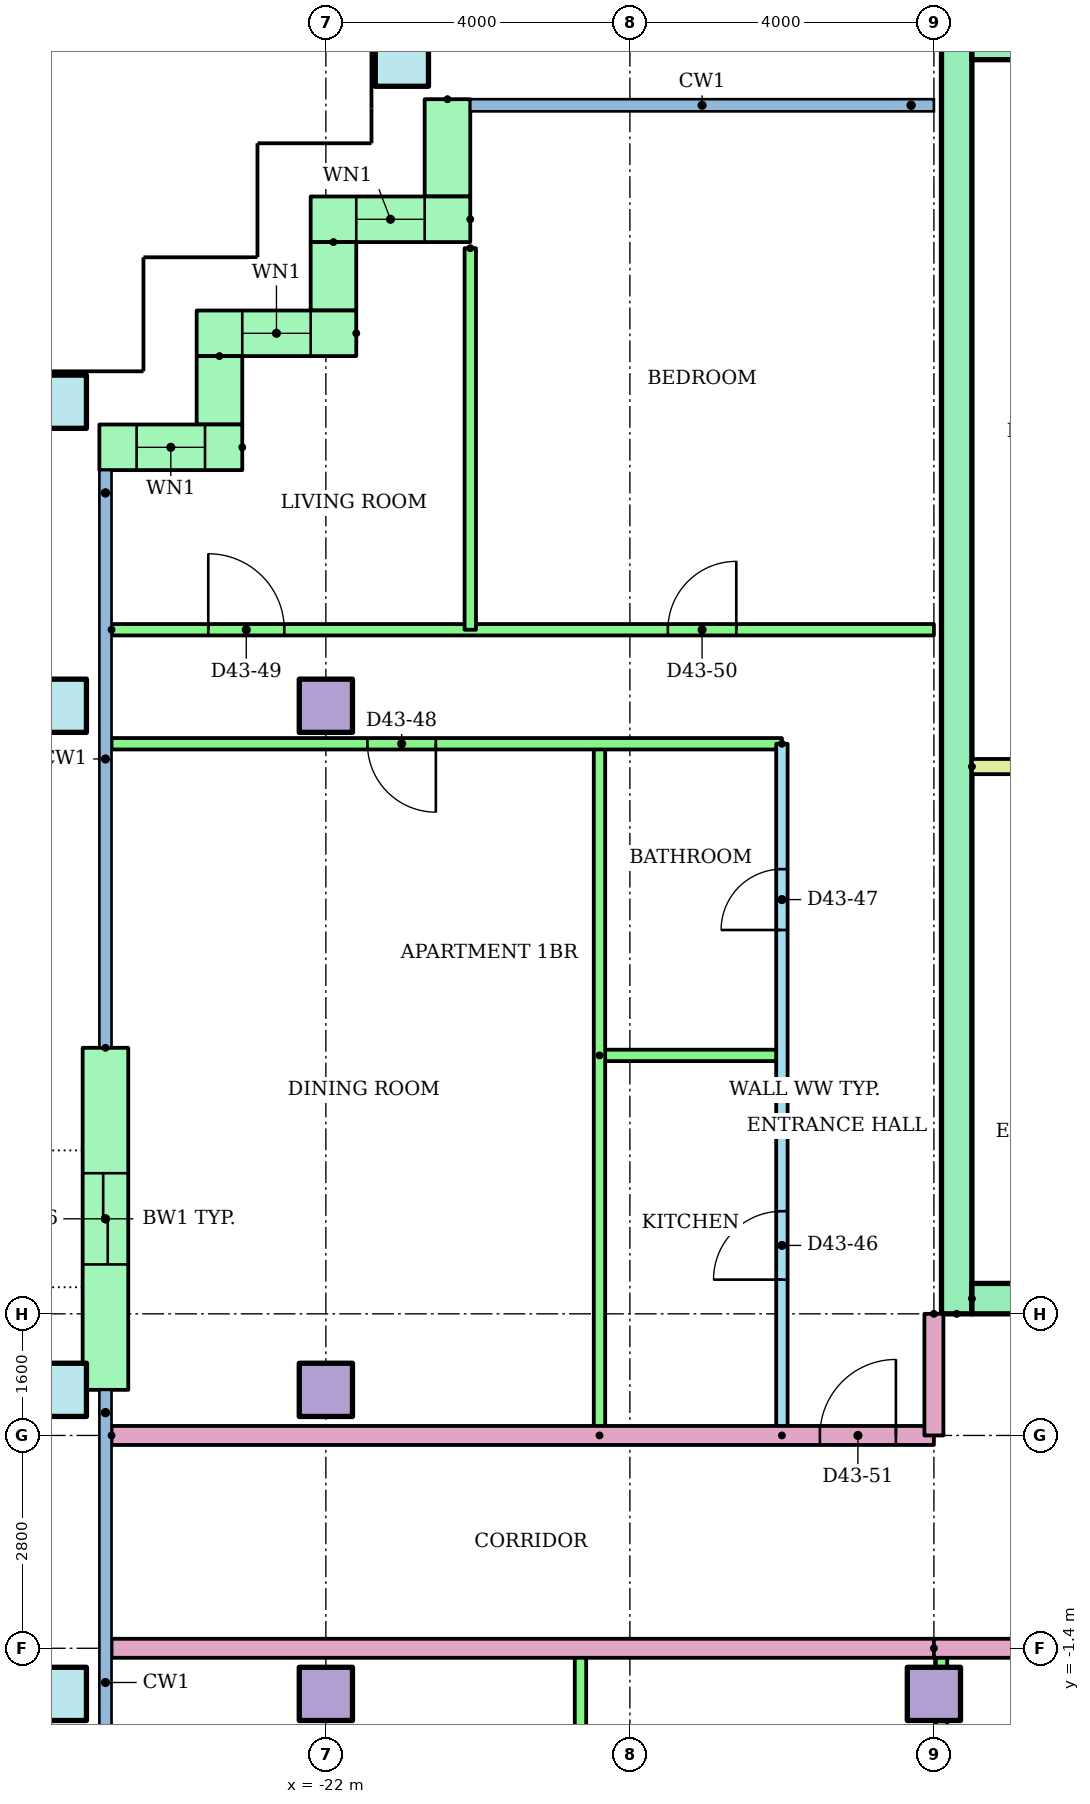
"""IFC4 building model, lengths in metres.
Left out: names, types, materials, properties, quantities, classifications, styles, units other than length and angle.
Written with IfcOpenShell. Run it as: python <this file> out.ifc"""

import sys

from ifc_helpers import new_model, si_unit, direction, frame, frame_2d, origin, origin_2d, place, context, subcontext, project, spatial, rectangle, hollow_rectangle, extrude, element, fill, save


model = new_model("IFC4")
c1 = context("Model", 3, precision=1e-05, world=origin(), true_north=direction((0.0, 1.0)))
c2 = subcontext(c1, "Body", "Model", "MODEL_VIEW")
j1 = project(units=[si_unit("LENGTHUNIT", "METRE"), si_unit("PLANEANGLEUNIT", "RADIAN")], contexts=[c1])
p1 = place(None, origin())
s1 = spatial("IfcSite", under=j1, at=p1, CompositionType="ELEMENT")
p2 = place(p1, origin())
s2 = spatial("IfcBuilding", under=s1, at=p2, CompositionType="ELEMENT")
p3 = place(p2, frame((0.0, 0.0, 168.5)))
s3 = spatial("IfcBuildingStorey", under=s2, at=p3, CompositionType="ELEMENT", Elevation=168.5)
p4 = place(p3, frame((-25.5, -2.0, 0.0)))
e1 = element("IfcColumn", 1, at=p4, inside=s3, PredefinedType="COLUMN", context=c2, shape_type="SweptSolid", body=[
    extrude(hollow_rectangle(XDim=0.7, YDim=0.7, WallThickness=0.036, at=origin_2d()), origin(), (0.0, 0.0, 1.0), 3.2),
])
for number, where in (
    (2, (-22.0, -2.0, 0.0)),
    (3, (-14.0, -2.0, 0.0)),
):
    element("IfcColumn", number, at=place(p3, frame(where)), inside=s3, PredefinedType="COLUMN", context=c2, shape_type="SweptSolid", body=[
        extrude(rectangle(XDim=0.7, YDim=0.7, at=origin_2d()), origin(), (0.0, 0.0, 1.0), 3.2),
    ])
p5 = place(p3, frame((-25.5, 2.0, 0.0)))
e4 = element("IfcColumn", 4, at=p5, inside=s3, PredefinedType="COLUMN", context=c2, shape_type="SweptSolid", body=[
    extrude(hollow_rectangle(XDim=0.7, YDim=0.7, WallThickness=0.036, at=origin_2d()), origin(), (0.0, 0.0, 1.0), 3.2),
])
p6 = place(p3, frame((-22.0, 2.0, 0.0)))
e5 = element("IfcColumn", 5, at=p6, inside=s3, PredefinedType="COLUMN", context=c2, shape_type="SweptSolid", body=[
    extrude(rectangle(XDim=0.7, YDim=0.7, at=origin_2d()), origin(), (0.0, 0.0, 1.0), 3.2),
])
p7 = place(p3, frame((-25.5, 11.0, 0.0)))
e6 = element("IfcColumn", 6, at=p7, inside=s3, PredefinedType="COLUMN", context=c2, shape_type="SweptSolid", body=[
    extrude(hollow_rectangle(XDim=0.7, YDim=0.7, WallThickness=0.036, at=origin_2d()), origin(), (0.0, 0.0, 1.0), 3.2),
])
p8 = place(p3, frame((-22.0, 11.0, 0.0)))
e7 = element("IfcColumn", 7, at=p8, inside=s3, PredefinedType="COLUMN", context=c2, shape_type="SweptSolid", body=[
    extrude(rectangle(XDim=0.7, YDim=0.7, at=origin_2d()), origin(), (0.0, 0.0, 1.0), 3.2),
])
for number, where in (
    (8, (-25.5, 15.0, 0.0)),
    (9, (-21.0, 19.5, 0.0)),
):
    element("IfcColumn", number, at=place(p3, frame(where)), inside=s3, PredefinedType="COLUMN", context=c2, shape_type="SweptSolid", body=[
        extrude(hollow_rectangle(XDim=0.7, YDim=0.7, WallThickness=0.036, at=origin_2d()), origin(), (0.0, 0.0, 1.0), 3.2),
    ])
p9 = place(p3, frame((-20.4, 18.98, 0.0), z_axis=(0.0, 0.0, 1.0), x_axis=(0.0, -1.0, 0.0)))
e10 = element("IfcWall", 10, at=p9, inside=s3, PredefinedType="STANDARD", context=c2, shape_type="SweptSolid", body=[
    extrude(rectangle(XDim=1.28, YDim=0.6, at=frame_2d((0.64, 0.0))), origin(), (0.0, 0.0, 1.0), 2.92),
])
p10 = place(p3, frame((-20.1, 17.4, 0.0), z_axis=(0.0, 0.0, 1.0), x_axis=(-1.0, 0.0, 0.0)))
e11 = element("IfcWall", 11, at=p10, inside=s3, PredefinedType="STANDARD", context=c2, shape_type="SweptSolid", body=[
    extrude(rectangle(XDim=2.1, YDim=0.6, at=frame_2d((1.05, 0.0))), origin(), (0.0, 0.0, 1.0), 2.92),
])
p11 = place(p10, frame((0.6, 0.0, 0.9)))
e12 = element("IfcOpeningElement", 12, at=p11, cuts=e11, PredefinedType="OPENING", context=c2, shape_type="SweptSolid", body=[
    extrude(rectangle(XDim=0.9, YDim=1.5, at=frame_2d((0.45, 0.75))), frame((0.0, 0.31, 0.0), z_axis=(0.0, -1.0, 0.0), x_axis=(1.0, 0.0, 0.0)), (0.0, 0.0, 1.0), 0.62),
])
p12 = place(p3, frame((-21.9, 17.1, 0.0), z_axis=(0.0, 0.0, 1.0), x_axis=(0.0, -1.0, 0.0)))
e13 = element("IfcWall", 13, at=p12, inside=s3, PredefinedType="STANDARD", context=c2, shape_type="SweptSolid", body=[
    extrude(rectangle(XDim=0.9, YDim=0.6, at=frame_2d((0.45, 0.0))), origin(), (0.0, 0.0, 1.0), 2.92),
])
p13 = place(p3, frame((-21.6, 15.9, 0.0), z_axis=(0.0, 0.0, 1.0), x_axis=(-1.0, 0.0, 0.0)))
e14 = element("IfcWall", 14, at=p13, inside=s3, PredefinedType="STANDARD", context=c2, shape_type="SweptSolid", body=[
    extrude(rectangle(XDim=2.1, YDim=0.6, at=frame_2d((1.05, 0.0))), origin(), (0.0, 0.0, 1.0), 2.92),
])
p14 = place(p13, frame((0.6, 0.0, 0.9)))
e15 = element("IfcOpeningElement", 15, at=p14, cuts=e14, PredefinedType="OPENING", context=c2, shape_type="SweptSolid", body=[
    extrude(rectangle(XDim=0.9, YDim=1.5, at=frame_2d((0.45, 0.75))), frame((0.0, 0.31, 0.0), z_axis=(0.0, -1.0, 0.0), x_axis=(1.0, 0.0, 0.0)), (0.0, 0.0, 1.0), 0.62),
])
p15 = place(p3, frame((-23.4, 15.6, 0.0), z_axis=(0.0, 0.0, 1.0), x_axis=(0.0, -1.0, 0.0)))
e16 = element("IfcWall", 16, at=p15, inside=s3, PredefinedType="STANDARD", context=c2, shape_type="SweptSolid", body=[
    extrude(rectangle(XDim=0.9, YDim=0.6, at=frame_2d((0.45, 0.0))), origin(), (0.0, 0.0, 1.0), 2.92),
])
p16 = place(p3, frame((-23.1, 14.4, 0.0), z_axis=(0.0, 0.0, 1.0), x_axis=(-1.0, 0.0, 0.0)))
e17 = element("IfcWall", 17, at=p16, inside=s3, PredefinedType="STANDARD", context=c2, shape_type="SweptSolid", body=[
    extrude(rectangle(XDim=1.88, YDim=0.6, at=frame_2d((0.94, 0.0))), origin(), (0.0, 0.0, 1.0), 2.92),
])
p17 = place(p16, frame((0.49, 0.0, 0.9)))
e18 = element("IfcOpeningElement", 18, at=p17, cuts=e17, PredefinedType="OPENING", context=c2, shape_type="SweptSolid", body=[
    extrude(rectangle(XDim=0.9, YDim=1.5, at=frame_2d((0.45, 0.75))), frame((0.0, 0.31, 0.0), z_axis=(0.0, -1.0, 0.0), x_axis=(1.0, 0.0, 0.0)), (0.0, 0.0, 1.0), 0.62),
])
p18 = place(p3, frame((-24.9, 6.5, 0.0), z_axis=(0.0, 0.0, 1.0), x_axis=(0.0, -1.0, 0.0)))
e19 = element("IfcWall", 19, at=p18, inside=s3, PredefinedType="STANDARD", context=c2, shape_type="SweptSolid", body=[
    extrude(rectangle(XDim=4.5, YDim=0.6, at=frame_2d((2.25, 0.0))), origin(), (0.0, 0.0, 1.0), 2.92),
])
p19 = place(p18, frame((1.65, 0.0, 0.0)))
e20 = element("IfcOpeningElement", 20, at=p19, cuts=e19, PredefinedType="OPENING", context=c2, shape_type="SweptSolid", body=[
    extrude(rectangle(XDim=1.2, YDim=2.1, at=frame_2d((0.6, 1.05))), frame((0.0, 0.31, 0.0), z_axis=(0.0, -1.0, 0.0), x_axis=(1.0, 0.0, 0.0)), (0.0, 0.0, 1.0), 0.62),
])
p20 = place(p3, frame((-13.7, 3.0, 0.0), z_axis=(0.0, 0.0, 1.0), x_axis=(0.0, 1.0, 0.0)))
e21 = element("IfcWall", 21, at=p20, inside=s3, PredefinedType="SHEAR", context=c2, shape_type="SweptSolid", body=[
    extrude(rectangle(XDim=17.0, YDim=0.4, at=frame_2d((8.5, 0.0))), origin(), (0.0, 0.0, 1.0), 2.92),
])
p21 = place(p3, frame((-13.5, 19.7, 0.0)))
e22 = element("IfcWall", 22, at=p21, inside=s3, PredefinedType="SHEAR", context=c2, shape_type="SweptSolid", body=[
    extrude(rectangle(XDim=27.0, YDim=0.4, at=frame_2d((13.5, 0.0))), origin(), (0.0, 0.0, 1.0), 2.92),
])
p22 = place(p3, frame((-13.5, 3.2, 0.0)))
e23 = element("IfcWall", 23, at=p22, inside=s3, PredefinedType="SHEAR", context=c2, shape_type="SweptSolid", body=[
    extrude(rectangle(XDim=27.0, YDim=0.4, at=frame_2d((13.5, 0.0))), origin(), (0.0, 0.0, 1.0), 2.92),
])
p23 = place(p22, frame((22.083, 0.0, 0.0)))
e24 = element("IfcOpeningElement", 24, at=p23, cuts=e23, PredefinedType="OPENING", context=c2, shape_type="SweptSolid", body=[
    extrude(rectangle(XDim=1.1, YDim=2.1, at=frame_2d((0.55, 1.05))), frame((0.0, 0.21, 0.0), z_axis=(0.0, -1.0, 0.0), x_axis=(1.0, 0.0, 0.0)), (0.0, 0.0, 1.0), 0.42),
])
p24 = place(p22, frame((25.128, 0.0, 0.0)))
e25 = element("IfcOpeningElement", 25, at=p24, cuts=e23, PredefinedType="OPENING", context=c2, shape_type="SweptSolid", body=[
    extrude(rectangle(XDim=1.1, YDim=2.1, at=frame_2d((0.55, 1.05))), frame((0.0, 0.21, 0.0), z_axis=(0.0, -1.0, 0.0), x_axis=(1.0, 0.0, 0.0)), (0.0, 0.0, 1.0), 0.42),
])
p25 = place(p22, frame((12.6, 0.0, 0.0)))
e26 = element("IfcOpeningElement", 26, at=p25, cuts=e23, PredefinedType="OPENING", context=c2, shape_type="SweptSolid", body=[
    extrude(rectangle(XDim=1.8, YDim=2.1, at=frame_2d((0.9, 1.05))), frame((0.0, 0.21, 0.0), z_axis=(0.0, -1.0, 0.0), x_axis=(1.0, 0.0, 0.0)), (0.0, 0.0, 1.0), 0.42),
])
p26 = place(p3, frame((-13.5, 10.2, 0.0)))
e27 = element("IfcWall", 27, at=p26, inside=s3, PredefinedType="PARTITIONING", context=c2, shape_type="SweptSolid", body=[
    extrude(rectangle(XDim=3.9, YDim=0.2, at=frame_2d((1.95, 0.0))), origin(), (0.0, 0.0, 1.0), 2.92),
])
for number, where, z_axis, x_axis in (
    (28, (-13.9, -8.1, 0.0), (0.0, 0.0, 1.0), (0.0, 1.0, 0.0)),
    (29, (-18.65, -8.1, 0.0), (0.0, 0.0, 1.0), (0.0, 1.0, 0.0)),
):
    element("IfcWall", number, at=place(p3, frame(where, z_axis=z_axis, x_axis=x_axis)), inside=s3, PredefinedType="PARTITIONING", context=c2, shape_type="SweptSolid", body=[
        extrude(rectangle(XDim=6.7, YDim=0.15, at=frame_2d((3.35, 0.0))), origin(), (0.0, 0.0, 1.0), 2.4),
    ])
p27 = place(p3, frame((-14.0, -1.4, 0.0), z_axis=(0.0, 0.0, 1.0), x_axis=(-1.0, 0.0, 0.0)))
e30 = element("IfcWall", 30, at=p27, inside=s3, PredefinedType="PARTITIONING", context=c2, shape_type="SweptSolid", body=[
    extrude(rectangle(XDim=10.82, YDim=0.25, at=frame_2d((5.41, 0.0))), origin(), (0.0, 0.0, 1.0), 2.4),
])
p28 = place(p3, frame((-16.0, 1.4, 0.0), z_axis=(0.0, 0.0, 1.0), x_axis=(0.0, 1.0, 0.0)))
e31 = element("IfcWall", 31, at=p28, inside=s3, PredefinedType="PARTITIONING", context=c2, shape_type="SweptSolid", body=[
    extrude(rectangle(XDim=9.1, YDim=0.15, at=frame_2d((4.55, 0.0))), origin(), (0.0, 0.0, 1.0), 2.4),
])
p29 = place(p28, frame((2.05, 0.0, 0.0)))
e32 = element("IfcOpeningElement", 32, at=p29, cuts=e31, PredefinedType="OPENING", context=c2, shape_type="SweptSolid", body=[
    extrude(rectangle(XDim=0.9, YDim=2.1, at=frame_2d((0.45, 1.05))), frame((0.0, 0.085, 0.0), z_axis=(0.0, -1.0, 0.0), x_axis=(1.0, 0.0, 0.0)), (0.0, 0.0, 1.0), 0.17),
])
p30 = place(p28, frame((6.65, 0.0, 0.0)))
e33 = element("IfcOpeningElement", 33, at=p30, cuts=e31, PredefinedType="OPENING", context=c2, shape_type="SweptSolid", body=[
    extrude(rectangle(XDim=0.8, YDim=2.1, at=frame_2d((0.4, 1.05))), frame((0.0, 0.085, 0.0), z_axis=(0.0, -1.0, 0.0), x_axis=(1.0, 0.0, 0.0)), (0.0, 0.0, 1.0), 0.17),
])
p31 = place(p3, frame((-18.4, 6.4, 0.0)))
e34 = element("IfcWall", 34, at=p31, inside=s3, PredefinedType="PARTITIONING", context=c2, shape_type="SweptSolid", body=[
    extrude(rectangle(XDim=2.4, YDim=0.15, at=frame_2d((1.2, 0.0))), origin(), (0.0, 0.0, 1.0), 2.4),
])
p32 = place(p3, frame((-18.4, 1.4, 0.0), z_axis=(0.0, 0.0, 1.0), x_axis=(0.0, 1.0, 0.0)))
e35 = element("IfcWall", 35, at=p32, inside=s3, PredefinedType="PARTITIONING", context=c2, shape_type="SweptSolid", body=[
    extrude(rectangle(XDim=9.1, YDim=0.15, at=frame_2d((4.55, 0.0))), origin(), (0.0, 0.0, 1.0), 2.4),
])
p33 = place(p3, frame((-16.0, 10.5, 0.0), z_axis=(0.0, 0.0, 1.0), x_axis=(-1.0, 0.0, 0.0)))
e36 = element("IfcWall", 36, at=p33, inside=s3, PredefinedType="PARTITIONING", context=c2, shape_type="SweptSolid", body=[
    extrude(rectangle(XDim=8.82, YDim=0.15, at=frame_2d((4.41, 0.0))), origin(), (0.0, 0.0, 1.0), 2.4),
])
p34 = place(p33, frame((4.553, 0.0, 0.0)))
e37 = element("IfcOpeningElement", 37, at=p34, cuts=e36, PredefinedType="OPENING", context=c2, shape_type="SweptSolid", body=[
    extrude(rectangle(XDim=0.9, YDim=2.1, at=frame_2d((0.45, 1.05))), frame((0.0, 0.085, 0.0), z_axis=(0.0, -1.0, 0.0), x_axis=(1.0, 0.0, 0.0)), (0.0, 0.0, 1.0), 0.17),
])
p35 = place(p3, frame((-24.82, 12.0, 0.0)))
e38 = element("IfcWall", 38, at=p35, inside=s3, PredefinedType="PARTITIONING", context=c2, shape_type="SweptSolid", body=[
    extrude(rectangle(XDim=10.82, YDim=0.15, at=frame_2d((5.41, 0.0))), origin(), (0.0, 0.0, 1.0), 2.4),
])
p36 = place(p35, frame((1.273, 0.0, 0.0)))
e39 = element("IfcOpeningElement", 39, at=p36, cuts=e38, PredefinedType="OPENING", context=c2, shape_type="SweptSolid", body=[
    extrude(rectangle(XDim=1.0, YDim=2.1, at=frame_2d((0.5, 1.05))), frame((0.0, 0.085, 0.0), z_axis=(0.0, -1.0, 0.0), x_axis=(1.0, 0.0, 0.0)), (0.0, 0.0, 1.0), 0.17),
])
p37 = place(p35, frame((7.32, 0.0, 0.0)))
e40 = element("IfcOpeningElement", 40, at=p37, cuts=e38, PredefinedType="OPENING", context=c2, shape_type="SweptSolid", body=[
    extrude(rectangle(XDim=0.9, YDim=2.1, at=frame_2d((0.45, 1.05))), frame((0.0, 0.085, 0.0), z_axis=(0.0, -1.0, 0.0), x_axis=(1.0, 0.0, 0.0)), (0.0, 0.0, 1.0), 0.17),
])
p38 = place(p3, frame((-20.1, 17.02, 0.0), z_axis=(0.0, 0.0, 1.0), x_axis=(0.0, -1.0, 0.0)))
e41 = element("IfcWall", 41, at=p38, inside=s3, PredefinedType="PARTITIONING", context=c2, shape_type="SweptSolid", body=[
    extrude(rectangle(XDim=5.02, YDim=0.15, at=frame_2d((2.51, 0.0))), origin(), (0.0, 0.0, 1.0), 2.4),
])
p39 = place(p3, frame((-24.82, 1.4, 0.0)))
e42 = element("IfcWall", 42, at=p39, inside=s3, PredefinedType="PARTITIONING", context=c2, shape_type="SweptSolid", body=[
    extrude(rectangle(XDim=10.82, YDim=0.25, at=frame_2d((5.41, 0.0))), origin(), (0.0, 0.0, 1.0), 2.4),
])
p40 = place(p39, frame((9.32, 0.0, 0.0)))
e43 = element("IfcOpeningElement", 43, at=p40, cuts=e42, PredefinedType="OPENING", context=c2, shape_type="SweptSolid", body=[
    extrude(rectangle(XDim=1.0, YDim=2.1, at=frame_2d((0.5, 1.05))), frame((0.0, 0.135, 0.0), z_axis=(0.0, -1.0, 0.0), x_axis=(1.0, 0.0, 0.0)), (0.0, 0.0, 1.0), 0.27),
])
p41 = place(p3, frame((14.0, -1.4, 0.0), z_axis=(0.0, 0.0, 1.0), x_axis=(-1.0, 0.0, 0.0)))
e44 = element("IfcWall", 44, at=p41, inside=s3, PredefinedType="PARTITIONING", context=c2, shape_type="SweptSolid", body=[
    extrude(rectangle(XDim=28.0, YDim=0.25, at=frame_2d((14.0, 0.0))), origin(), (0.0, 0.0, 1.0), 2.4),
])
p42 = place(p41, frame((20.547, 0.0, 0.0)))
e45 = element("IfcOpeningElement", 45, at=p42, cuts=e44, PredefinedType="OPENING", context=c2, shape_type="SweptSolid", body=[
    extrude(rectangle(XDim=1.0, YDim=2.1, at=frame_2d((0.5, 1.05))), frame((0.0, 0.135, 0.0), z_axis=(0.0, -1.0, 0.0), x_axis=(1.0, 0.0, 0.0)), (0.0, 0.0, 1.0), 0.27),
])
p43 = place(p41, frame((18.453, 0.0, 0.0)))
e46 = element("IfcOpeningElement", 46, at=p43, cuts=e44, PredefinedType="OPENING", context=c2, shape_type="SweptSolid", body=[
    extrude(rectangle(XDim=1.0, YDim=2.1, at=frame_2d((0.5, 1.05))), frame((0.0, 0.135, 0.0), z_axis=(0.0, -1.0, 0.0), x_axis=(1.0, 0.0, 0.0)), (0.0, 0.0, 1.0), 0.27),
])
p44 = place(p41, frame((2.453, 0.0, 0.0)))
e47 = element("IfcOpeningElement", 47, at=p44, cuts=e44, PredefinedType="OPENING", context=c2, shape_type="SweptSolid", body=[
    extrude(rectangle(XDim=1.0, YDim=2.1, at=frame_2d((0.5, 1.05))), frame((0.0, 0.135, 0.0), z_axis=(0.0, -1.0, 0.0), x_axis=(1.0, 0.0, 0.0)), (0.0, 0.0, 1.0), 0.27),
])
p45 = place(p3, frame((-14.0, 3.0, 0.0), z_axis=(0.0, 0.0, 1.0), x_axis=(0.0, -1.0, 0.0)))
e48 = element("IfcWall", 48, at=p45, inside=s3, PredefinedType="PARTITIONING", context=c2, shape_type="SweptSolid", body=[
    extrude(rectangle(XDim=1.6, YDim=0.25, at=frame_2d((0.8, 0.0))), origin(), (0.0, 0.0, 1.0), 2.4),
])
p46 = place(p11, origin())
e49 = element("IfcWindow", 49, at=p46, inside=s3, PartitioningType="SINGLE_PANEL", PredefinedType="WINDOW", context=c2, shape_type="SweptSolid", body=[
    extrude(rectangle(XDim=0.9, YDim=1.5, at=frame_2d((0.45, 0.75))), frame((0.0, 0.03, 0.0), z_axis=(0.0, -1.0, 0.0), x_axis=(1.0, 0.0, 0.0)), (0.0, 0.0, 1.0), 0.06),
])
fill(e12, e49)
p47 = place(p14, origin())
e50 = element("IfcWindow", 50, at=p47, inside=s3, PartitioningType="SINGLE_PANEL", PredefinedType="WINDOW", context=c2, shape_type="SweptSolid", body=[
    extrude(rectangle(XDim=0.9, YDim=1.5, at=frame_2d((0.45, 0.75))), frame((0.0, 0.03, 0.0), z_axis=(0.0, -1.0, 0.0), x_axis=(1.0, 0.0, 0.0)), (0.0, 0.0, 1.0), 0.06),
])
fill(e15, e50)
p48 = place(p17, origin())
e51 = element("IfcWindow", 51, at=p48, inside=s3, PartitioningType="SINGLE_PANEL", PredefinedType="WINDOW", context=c2, shape_type="SweptSolid", body=[
    extrude(rectangle(XDim=0.9, YDim=1.5, at=frame_2d((0.45, 0.75))), frame((0.0, 0.03, 0.0), z_axis=(0.0, -1.0, 0.0), x_axis=(1.0, 0.0, 0.0)), (0.0, 0.0, 1.0), 0.06),
])
fill(e18, e51)
p49 = place(p29, origin())
e52 = element("IfcDoor", 52, at=p49, inside=s3, OperationType="SINGLE_SWING_LEFT", PredefinedType="DOOR", context=c2, shape_type="SweptSolid", body=[
    extrude(rectangle(XDim=0.9, YDim=2.1, at=frame_2d((0.45, 1.05))), frame((0.0, 0.025, 0.0), z_axis=(0.0, -1.0, 0.0), x_axis=(1.0, 0.0, 0.0)), (0.0, 0.0, 1.0), 0.05),
])
fill(e32, e52)
p50 = place(p30, origin())
e53 = element("IfcDoor", 53, at=p50, inside=s3, OperationType="SINGLE_SWING_LEFT", PredefinedType="DOOR", context=c2, shape_type="SweptSolid", body=[
    extrude(rectangle(XDim=0.8, YDim=2.1, at=frame_2d((0.4, 1.05))), frame((0.0, 0.025, 0.0), z_axis=(0.0, -1.0, 0.0), x_axis=(1.0, 0.0, 0.0)), (0.0, 0.0, 1.0), 0.05),
])
fill(e33, e53)
p51 = place(p34, origin())
e54 = element("IfcDoor", 54, at=p51, inside=s3, OperationType="SINGLE_SWING_LEFT", PredefinedType="DOOR", context=c2, shape_type="SweptSolid", body=[
    extrude(rectangle(XDim=0.9, YDim=2.1, at=frame_2d((0.45, 1.05))), frame((0.0, 0.025, 0.0), z_axis=(0.0, -1.0, 0.0), x_axis=(1.0, 0.0, 0.0)), (0.0, 0.0, 1.0), 0.05),
])
fill(e37, e54)
p52 = place(p36, origin())
e55 = element("IfcDoor", 55, at=p52, inside=s3, OperationType="SINGLE_SWING_LEFT", PredefinedType="DOOR", context=c2, shape_type="SweptSolid", body=[
    extrude(rectangle(XDim=1.0, YDim=2.1, at=frame_2d((0.5, 1.05))), frame((0.0, 0.025, 0.0), z_axis=(0.0, -1.0, 0.0), x_axis=(1.0, 0.0, 0.0)), (0.0, 0.0, 1.0), 0.05),
])
fill(e39, e55)
p53 = place(p37, origin())
e56 = element("IfcDoor", 56, at=p53, inside=s3, OperationType="SINGLE_SWING_RIGHT", PredefinedType="DOOR", context=c2, shape_type="SweptSolid", body=[
    extrude(rectangle(XDim=0.9, YDim=2.1, at=frame_2d((0.45, 1.05))), frame((0.0, 0.025, 0.0), z_axis=(0.0, -1.0, 0.0), x_axis=(1.0, 0.0, 0.0)), (0.0, 0.0, 1.0), 0.05),
])
fill(e40, e56)
p54 = place(p40, origin())
e57 = element("IfcDoor", 57, at=p54, inside=s3, OperationType="SINGLE_SWING_RIGHT", PredefinedType="DOOR", context=c2, shape_type="SweptSolid", body=[
    extrude(rectangle(XDim=1.0, YDim=2.1, at=frame_2d((0.5, 1.05))), frame((0.0, 0.025, 0.0), z_axis=(0.0, -1.0, 0.0), x_axis=(1.0, 0.0, 0.0)), (0.0, 0.0, 1.0), 0.05),
])
fill(e43, e57)
p55 = place(p19, origin())
e58 = element("IfcDoor", 58, at=p55, inside=s3, OperationType="SLIDING_TO_LEFT", PredefinedType="DOOR", context=c2, shape_type="SweptSolid", body=[
    extrude(rectangle(XDim=1.2, YDim=2.1, at=frame_2d((0.6, 1.05))), frame((0.0, 0.025, 0.0), z_axis=(0.0, -1.0, 0.0), x_axis=(1.0, 0.0, 0.0)), (0.0, 0.0, 1.0), 0.05),
])
fill(e20, e58)
save(model, sys.argv[1])
